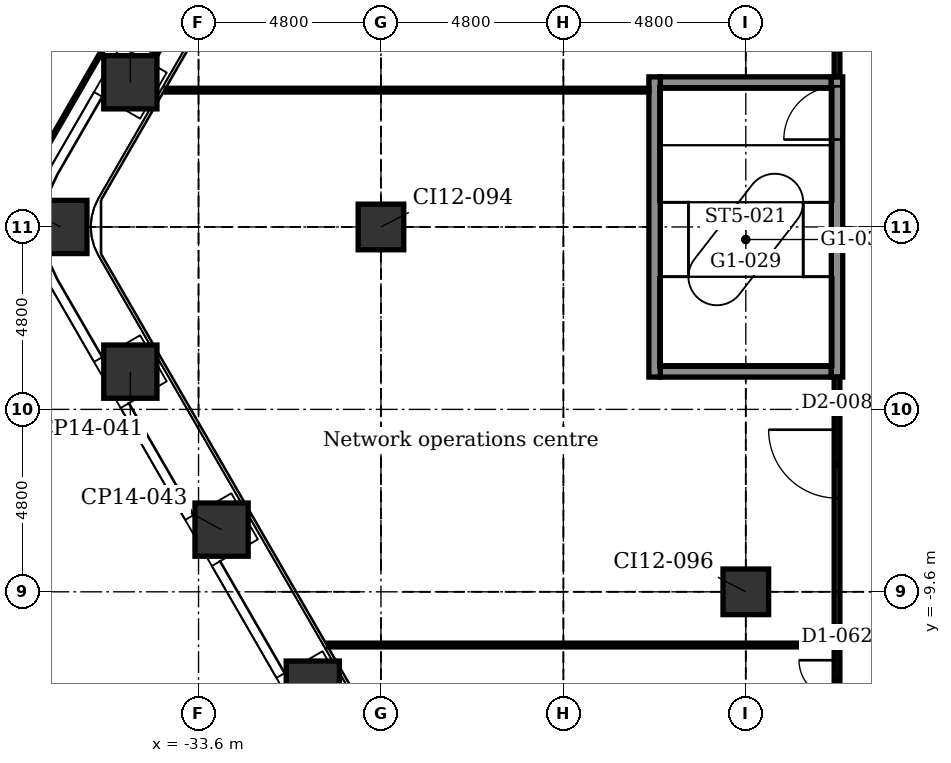
"""IFC4 building model, lengths in metres.
Left out: names, types, materials, properties, quantities, classifications, styles, units other than length and angle.
Written with IfcOpenShell. Run it as: python <this file> out.ifc"""

import sys

from ifc_helpers import new_model, si_unit, direction, frame, frame_2d, origin, origin_2d, place, context, subcontext, project, spatial, rectangle, extrude, element, fill, save


model = new_model("IFC4")
c1 = context("Model", 3, precision=1e-05, world=origin(), true_north=direction((0.0, 1.0)))
c2 = subcontext(c1, "Body", "Model", "MODEL_VIEW")
j1 = project(units=[si_unit("LENGTHUNIT", "METRE"), si_unit("PLANEANGLEUNIT", "RADIAN")], contexts=[c1])
p1 = place(None, origin())
s1 = spatial("IfcSite", under=j1, at=p1, CompositionType="ELEMENT")
p2 = place(p1, origin())
s2 = spatial("IfcBuilding", under=s1, at=p2, CompositionType="ELEMENT")
p3 = place(p2, frame((0.0, 0.0, 17.4)))
s3 = spatial("IfcBuildingStorey", under=s2, at=p3, CompositionType="ELEMENT", Elevation=17.4)
for number, where, z_axis, x_axis in (
    (1, (-30.594, -12.121, -0.25), (0.0, 0.0, 1.0), (0.866, 0.5, 0.0)),
    (2, (-32.994, -7.964, -0.25), (0.0, 0.0, 1.0), (0.866, 0.5, 0.0)),
    (3, (-35.394, -3.807, -0.25), (0.0, 0.0, 1.0), (0.866, 0.5, 0.0)),
    (4, (-37.236, 0.0, -0.25), (0.0, 0.0, 1.0), (1.0, 0.0, 0.0)),
    (5, (-35.394, 3.807, -0.25), (0.0, 0.0, 1.0), (0.5, 0.866, 0.0)),
):
    element("IfcColumn", number, at=place(p3, frame(where, z_axis=z_axis, x_axis=x_axis)), inside=s3, PredefinedType="COLUMN", context=c2, shape_type="SweptSolid", body=[
        extrude(rectangle(XDim=1.4, YDim=1.4, at=origin_2d()), origin(), (0.0, 0.0, 1.0), 5.0),
    ])
for number, where, z_axis, x_axis in (
    (6, (-28.8, 0.0, -0.25), (0.0, 0.0, 1.0), (1.0, 0.0, 0.0)),
    (7, (-19.2, -9.6, -0.25), (0.0, 0.0, 1.0), (1.0, 0.0, 0.0)),
):
    element("IfcColumn", number, at=place(p3, frame(where, z_axis=z_axis, x_axis=x_axis)), inside=s3, PredefinedType="COLUMN", context=c2, shape_type="SweptSolid", body=[
        extrude(rectangle(XDim=1.2, YDim=1.2, at=origin_2d()), origin(), (0.0, 0.0, 1.0), 5.0),
    ])
for number, where, z_axis, x_axis in (
    (8, (-21.45, -3.8, -0.25), (0.0, 0.0, 1.0), (1.0, 0.0, 0.0)),
    (9, (-21.45, 3.8, -0.25), (0.0, 0.0, 1.0), (1.0, 0.0, 0.0)),
):
    element("IfcWall", number, at=place(p3, frame(where, z_axis=z_axis, x_axis=x_axis)), inside=s3, PredefinedType="STANDARD", context=c2, shape_type="SweptSolid", body=[
        extrude(rectangle(XDim=4.5, YDim=0.3, at=frame_2d((2.25, 0.0))), origin(), (0.0, 0.0, 1.0), 5.0),
    ])
p4 = place(p3, frame((-21.6, -3.95, -0.25), z_axis=(0.0, 0.0, 1.0), x_axis=(0.0, 1.0, 0.0)))
e10 = element("IfcWall", 10, at=p4, inside=s3, PredefinedType="STANDARD", context=c2, shape_type="SweptSolid", body=[
    extrude(rectangle(XDim=7.9, YDim=0.3, at=frame_2d((3.95, 0.0))), origin(), (0.0, 0.0, 1.0), 5.0),
])
p5 = place(p3, frame((-16.8, -3.95, -0.25), z_axis=(0.0, 0.0, 1.0), x_axis=(0.0, 1.0, 0.0)))
e11 = element("IfcWall", 11, at=p5, inside=s3, PredefinedType="STANDARD", context=c2, shape_type="SweptSolid", body=[
    extrude(rectangle(XDim=7.9, YDim=0.3, at=frame_2d((3.95, 0.0))), origin(), (0.0, 0.0, 1.0), 5.0),
])
p6 = place(p5, frame((6.25, 0.0, 0.25)))
e12 = element("IfcOpeningElement", 12, at=p6, cuts=e11, PredefinedType="OPENING", context=c2, shape_type="SweptSolid", body=[
    extrude(rectangle(XDim=1.4, YDim=2.1, at=frame_2d((0.7, 1.05))), frame((0.0, 0.16, 0.0), z_axis=(0.0, -1.0, 0.0), x_axis=(1.0, 0.0, 0.0)), (0.0, 0.0, 1.0), 0.32),
])
p7 = place(p3, frame((-34.937, 4.698, 0.0), z_axis=(0.0, 0.0, 1.0), x_axis=(0.49998411664, 0.866034573852, 0.0)))
e13 = element("IfcWall", 13, at=p7, inside=s3, PredefinedType="USERDEFINED", context=c2, shape_type="SweptSolid", body=[
    extrude(rectangle(XDim=2.8, YDim=0.6, at=frame_2d((1.4, 0.0))), origin(), (0.0, 0.0, 1.0), 0.7),
])
p8 = place(p3, frame((-16.8, -13.0, 0.0), z_axis=(0.0, 0.0, 1.0), x_axis=(0.0, 1.0, 0.0)))
e14 = element("IfcWall", 14, at=p8, inside=s3, PredefinedType="PARTITIONING", context=c2, shape_type="SweptSolid", body=[
    extrude(rectangle(XDim=9.05, YDim=0.15, at=frame_2d((4.525, 0.0))), origin(), (0.0, 0.0, 1.0), 4.75),
])
p9 = place(p8, frame((0.6, 0.0, 0.0)))
e15 = element("IfcOpeningElement", 15, at=p9, cuts=e14, PredefinedType="OPENING", context=c2, shape_type="SweptSolid", body=[
    extrude(rectangle(XDim=1.0, YDim=2.1, at=frame_2d((0.5, 1.05))), frame((0.0, 0.085, 0.0), z_axis=(0.0, -1.0, 0.0), x_axis=(1.0, 0.0, 0.0)), (0.0, 0.0, 1.0), 0.17),
])
p10 = place(p8, frame((5.865, 0.0, 0.0)))
e16 = element("IfcOpeningElement", 16, at=p10, cuts=e14, PredefinedType="OPENING", context=c2, shape_type="SweptSolid", body=[
    extrude(rectangle(XDim=1.8, YDim=2.1, at=frame_2d((0.9, 1.05))), frame((0.0, 0.085, 0.0), z_axis=(0.0, -1.0, 0.0), x_axis=(1.0, 0.0, 0.0)), (0.0, 0.0, 1.0), 0.17),
])
p11 = place(p3, frame((-16.8, 3.95, 0.0), z_axis=(0.0, 0.0, 1.0), x_axis=(0.0, 1.0, 0.0)))
e17 = element("IfcWall", 17, at=p11, inside=s3, PredefinedType="PARTITIONING", context=c2, shape_type="SweptSolid", body=[
    extrude(rectangle(XDim=9.35, YDim=0.15, at=frame_2d((4.675, 0.0))), origin(), (0.0, 0.0, 1.0), 4.75),
])
p12 = place(p11, frame((0.95, 0.0, 0.0)))
e18 = element("IfcOpeningElement", 18, at=p12, cuts=e17, PredefinedType="OPENING", context=c2, shape_type="SweptSolid", body=[
    extrude(rectangle(XDim=1.0, YDim=2.1, at=frame_2d((0.5, 1.05))), frame((0.0, 0.085, 0.0), z_axis=(0.0, -1.0, 0.0), x_axis=(1.0, 0.0, 0.0)), (0.0, 0.0, 1.0), 0.17),
])
p13 = place(p11, frame((3.675, 0.0, 0.0)))
e19 = element("IfcOpeningElement", 19, at=p13, cuts=e17, PredefinedType="OPENING", context=c2, shape_type="SweptSolid", body=[
    extrude(rectangle(XDim=1.0, YDim=2.1, at=frame_2d((0.5, 1.05))), frame((0.0, 0.085, 0.0), z_axis=(0.0, -1.0, 0.0), x_axis=(1.0, 0.0, 0.0)), (0.0, 0.0, 1.0), 0.17),
])
p14 = place(p11, frame((6.85, 0.0, 0.0)))
e20 = element("IfcOpeningElement", 20, at=p14, cuts=e17, PredefinedType="OPENING", context=c2, shape_type="SweptSolid", body=[
    extrude(rectangle(XDim=1.0, YDim=2.1, at=frame_2d((0.5, 1.05))), frame((0.0, 0.085, 0.0), z_axis=(0.0, -1.0, 0.0), x_axis=(1.0, 0.0, 0.0)), (0.0, 0.0, 1.0), 0.17),
])
p15 = place(p3, frame((-30.178, -11.0, 0.0), z_axis=(0.0, 0.0, 1.0), x_axis=(1.0, 0.0, 0.0)))
e21 = element("IfcWall", 21, at=p15, inside=s3, PredefinedType="PARTITIONING", context=c2, shape_type="SweptSolid", body=[
    extrude(rectangle(XDim=13.378, YDim=0.1, at=frame_2d((6.689, 0.0))), origin(), (0.0, 0.0, 1.0), 4.75),
])
p16 = place(p3, frame((-34.451, 3.6, 0.0), z_axis=(0.0, 0.0, 1.0), x_axis=(1.0, 0.0, 0.0)))
e22 = element("IfcWall", 22, at=p16, inside=s3, PredefinedType="PARTITIONING", context=c2, shape_type="SweptSolid", body=[
    extrude(rectangle(XDim=12.701, YDim=0.1, at=frame_2d((6.351, 0.0))), origin(), (0.0, 0.0, 1.0), 4.75),
])
p17 = place(p9, origin())
e23 = element("IfcDoor", 23, at=p17, inside=s3, OperationType="SINGLE_SWING_RIGHT", PredefinedType="DOOR", context=c2, shape_type="SweptSolid", body=[
    extrude(rectangle(XDim=1.0, YDim=2.1, at=frame_2d((0.5, 1.05))), frame((0.0, 0.025, 0.0), z_axis=(0.0, -1.0, 0.0), x_axis=(1.0, 0.0, 0.0)), (0.0, 0.0, 1.0), 0.05),
])
fill(e15, e23)
p18 = place(p10, origin())
e24 = element("IfcDoor", 24, at=p18, inside=s3, OperationType="SINGLE_SWING_RIGHT", PredefinedType="DOOR", context=c2, shape_type="SweptSolid", body=[
    extrude(rectangle(XDim=1.8, YDim=2.1, at=frame_2d((0.9, 1.05))), frame((0.0, 0.025, 0.0), z_axis=(0.0, -1.0, 0.0), x_axis=(1.0, 0.0, 0.0)), (0.0, 0.0, 1.0), 0.05),
])
fill(e16, e24)
p19 = place(p6, origin())
e25 = element("IfcDoor", 25, at=p19, inside=s3, OperationType="SINGLE_SWING_LEFT", PredefinedType="DOOR", context=c2, shape_type="SweptSolid", body=[
    extrude(rectangle(XDim=1.4, YDim=2.1, at=frame_2d((0.7, 1.05))), frame((0.0, 0.025, 0.0), z_axis=(0.0, -1.0, 0.0), x_axis=(1.0, 0.0, 0.0)), (0.0, 0.0, 1.0), 0.05),
])
fill(e12, e25)
save(model, sys.argv[1])
